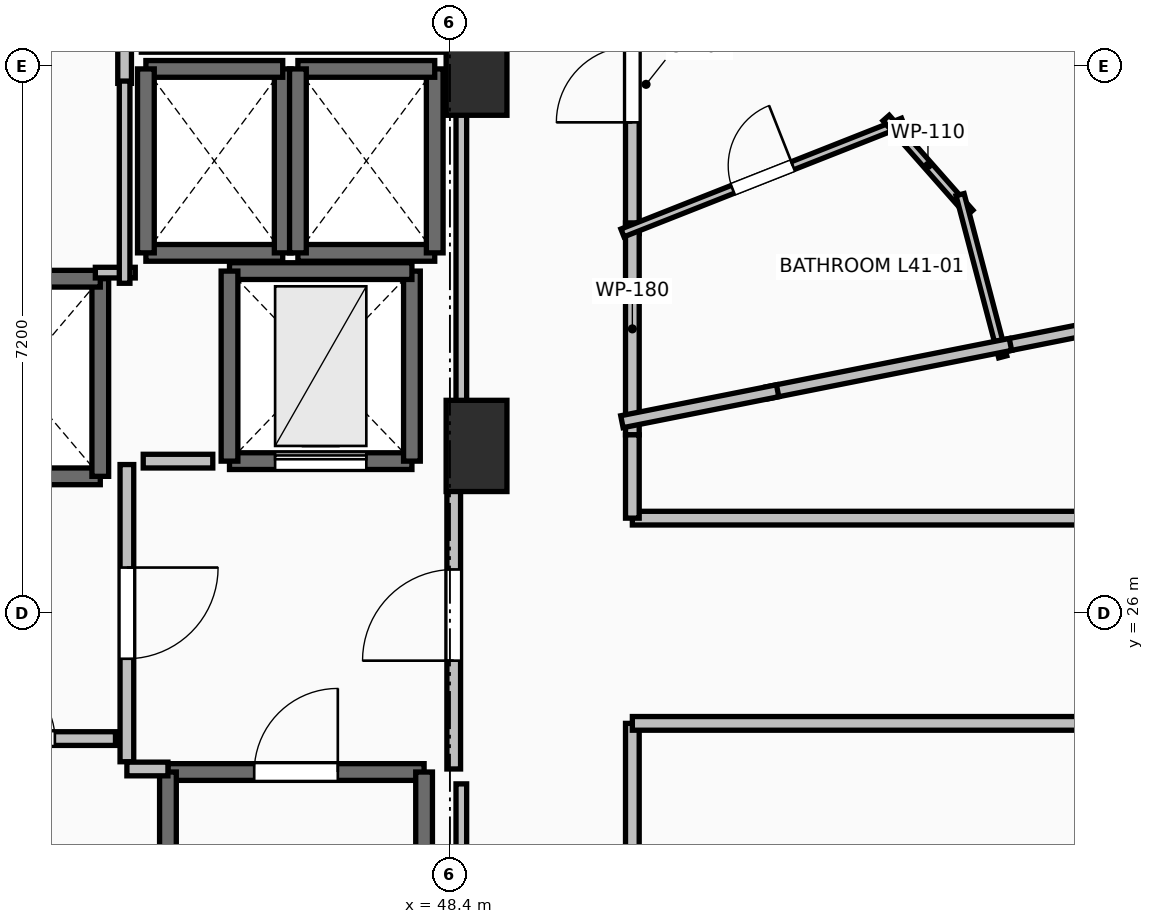
"""IFC4 building model, lengths in metres.
Left out: names, types, materials, properties, quantities, classifications, styles, units other than length and angle.
Written with IfcOpenShell. Run it as: python <this file> out.ifc"""

import sys

from ifc_helpers import new_model, si_unit, direction, frame, frame_2d, origin, origin_2d, place, context, subcontext, project, spatial, rectangle, extrude, element, fill, save


model = new_model("IFC4")
c1 = context("Model", 3, precision=1e-05, world=origin(), true_north=direction((0.0, 1.0)))
c2 = subcontext(c1, "Body", "Model", "MODEL_VIEW")
j1 = project(units=[si_unit("LENGTHUNIT", "METRE"), si_unit("PLANEANGLEUNIT", "RADIAN")], contexts=[c1])
p1 = place(None, origin())
s1 = spatial("IfcSite", under=j1, at=p1, CompositionType="ELEMENT")
p2 = place(p1, origin())
s2 = spatial("IfcBuilding", under=s1, at=p2, CompositionType="ELEMENT")
p3 = place(p2, frame((0.0, 0.0, 153.6)))
s3 = spatial("IfcBuildingStorey", under=s2, at=p3, CompositionType="ELEMENT", Elevation=153.6)
for number, where, z_axis, x_axis in (
    (1, (48.75, 33.15, 0.0), (0.0, 0.0, 1.0), (1.0, 0.0, 0.0)),
    (2, (48.75, 28.2, 0.0), (0.0, 0.0, 1.0), (1.0, 0.0, 0.0)),
):
    element("IfcColumn", number, at=place(p3, frame(where, z_axis=z_axis, x_axis=x_axis)), inside=s3, PredefinedType="PILASTER", context=c2, shape_type="SweptSolid", body=[
        extrude(rectangle(XDim=0.8, YDim=1.2, at=origin_2d()), origin(), (0.0, 0.0, 1.0), 3.5),
    ])
p4 = place(p3, frame((44.69, 23.91, 0.0), z_axis=(0.0, 0.0, 1.0), x_axis=(1.0, 0.0, 0.0)))
e3 = element("IfcWall", 3, at=p4, inside=s3, PredefinedType="SOLIDWALL", context=c2, shape_type="SweptSolid", body=[
    extrude(rectangle(XDim=3.37, YDim=0.22, at=frame_2d((1.685, 0.0))), origin(), (0.0, 0.0, 1.0), 3.24),
])
p5 = place(p4, frame((1.135, 0.0, 0.0)))
e4 = element("IfcOpeningElement", 4, at=p5, cuts=e3, PredefinedType="OPENING", context=c2, shape_type="SweptSolid", body=[
    extrude(rectangle(XDim=1.1, YDim=2.15, at=frame_2d((0.55, 1.075))), frame((0.0, 0.125, 0.0), z_axis=(0.0, -1.0, 0.0), x_axis=(1.0, 0.0, 0.0)), (0.0, 0.0, 1.0), 0.25),
])
for number, where, z_axis, x_axis in (
    (5, (48.06, 23.91, 0.0), (0.0, 0.0, 1.0), (0.0, -1.0, 0.0)),
    (6, (44.69, 16.49, 0.0), (0.0, 0.0, 1.0), (0.0, 1.0, 0.0)),
):
    element("IfcWall", number, at=place(p3, frame(where, z_axis=z_axis, x_axis=x_axis)), inside=s3, PredefinedType="SOLIDWALL", context=c2, shape_type="SweptSolid", body=[
        extrude(rectangle(XDim=7.42, YDim=0.22, at=frame_2d((3.71, 0.0))), origin(), (0.0, 0.0, 1.0), 3.24),
    ])
p6 = place(p3, frame((41.6, 27.8, 0.0), z_axis=(0.0, 0.0, 1.0), x_axis=(1.0, 0.0, 0.0)))
e7 = element("IfcWall", 7, at=p6, inside=s3, PredefinedType="SOLIDWALL", context=c2, shape_type="SweptSolid", body=[
    extrude(rectangle(XDim=2.2, YDim=0.22, at=frame_2d((1.1, 0.0))), origin(), (0.0, 0.0, 1.0), 3.24),
])
p7 = place(p3, frame((43.8, 27.8, 0.0), z_axis=(0.0, 0.0, 1.0), x_axis=(0.0, 1.0, 0.0)))
e8 = element("IfcWall", 8, at=p7, inside=s3, PredefinedType="SOLIDWALL", context=c2, shape_type="SweptSolid", body=[
    extrude(rectangle(XDim=2.6, YDim=0.22, at=frame_2d((1.3, 0.0))), origin(), (0.0, 0.0, 1.0), 3.24),
])
p8 = place(p3, frame((43.8, 30.4, 0.0), z_axis=(0.0, 0.0, 1.0), x_axis=(-1.0, 0.0, 0.0)))
e9 = element("IfcWall", 9, at=p8, inside=s3, PredefinedType="SOLIDWALL", context=c2, shape_type="SweptSolid", body=[
    extrude(rectangle(XDim=2.2, YDim=0.22, at=frame_2d((1.1, 0.0))), origin(), (0.0, 0.0, 1.0), 3.24),
])
p9 = place(p3, frame((44.4, 30.74, 0.0), z_axis=(0.0, 0.0, 1.0), x_axis=(1.0, 0.0, 0.0)))
e10 = element("IfcWall", 10, at=p9, inside=s3, PredefinedType="SOLIDWALL", context=c2, shape_type="SweptSolid", body=[
    extrude(rectangle(XDim=1.8, YDim=0.22, at=frame_2d((0.9, 0.0))), origin(), (0.0, 0.0, 1.0), 3.24),
])
p10 = place(p3, frame((46.2, 30.74, 0.0), z_axis=(0.0, 0.0, 1.0), x_axis=(0.0, 1.0, 0.0)))
e11 = element("IfcWall", 11, at=p10, inside=s3, PredefinedType="SOLIDWALL", context=c2, shape_type="SweptSolid", body=[
    extrude(rectangle(XDim=2.42, YDim=0.22, at=frame_2d((1.21, 0.0))), origin(), (0.0, 0.0, 1.0), 3.24),
])
p11 = place(p3, frame((46.2, 33.16, 0.0), z_axis=(0.0, 0.0, 1.0), x_axis=(-1.0, 0.0, 0.0)))
e12 = element("IfcWall", 12, at=p11, inside=s3, PredefinedType="SOLIDWALL", context=c2, shape_type="SweptSolid", body=[
    extrude(rectangle(XDim=1.8, YDim=0.22, at=frame_2d((0.9, 0.0))), origin(), (0.0, 0.0, 1.0), 3.24),
])
p12 = place(p3, frame((44.4, 33.16, 0.0), z_axis=(0.0, 0.0, 1.0), x_axis=(0.0, -1.0, 0.0)))
e13 = element("IfcWall", 13, at=p12, inside=s3, PredefinedType="SOLIDWALL", context=c2, shape_type="SweptSolid", body=[
    extrude(rectangle(XDim=2.42, YDim=0.22, at=frame_2d((1.21, 0.0))), origin(), (0.0, 0.0, 1.0), 3.24),
])
p13 = place(p3, frame((46.4, 30.74, 0.0), z_axis=(0.0, 0.0, 1.0), x_axis=(1.0, 0.0, 0.0)))
e14 = element("IfcWall", 14, at=p13, inside=s3, PredefinedType="SOLIDWALL", context=c2, shape_type="SweptSolid", body=[
    extrude(rectangle(XDim=1.8, YDim=0.22, at=frame_2d((0.9, 0.0))), origin(), (0.0, 0.0, 1.0), 3.24),
])
p14 = place(p3, frame((48.2, 30.74, 0.0), z_axis=(0.0, 0.0, 1.0), x_axis=(0.0, 1.0, 0.0)))
e15 = element("IfcWall", 15, at=p14, inside=s3, PredefinedType="SOLIDWALL", context=c2, shape_type="SweptSolid", body=[
    extrude(rectangle(XDim=2.42, YDim=0.22, at=frame_2d((1.21, 0.0))), origin(), (0.0, 0.0, 1.0), 3.24),
])
p15 = place(p3, frame((48.2, 33.16, 0.0), z_axis=(0.0, 0.0, 1.0), x_axis=(-1.0, 0.0, 0.0)))
e16 = element("IfcWall", 16, at=p15, inside=s3, PredefinedType="SOLIDWALL", context=c2, shape_type="SweptSolid", body=[
    extrude(rectangle(XDim=1.8, YDim=0.22, at=frame_2d((0.9, 0.0))), origin(), (0.0, 0.0, 1.0), 3.24),
])
p16 = place(p3, frame((46.4, 33.16, 0.0), z_axis=(0.0, 0.0, 1.0), x_axis=(0.0, -1.0, 0.0)))
e17 = element("IfcWall", 17, at=p16, inside=s3, PredefinedType="SOLIDWALL", context=c2, shape_type="SweptSolid", body=[
    extrude(rectangle(XDim=2.42, YDim=0.22, at=frame_2d((1.21, 0.0))), origin(), (0.0, 0.0, 1.0), 3.24),
])
p17 = place(p3, frame((45.5, 28.0, 0.0), z_axis=(0.0, 0.0, 1.0), x_axis=(1.0, 0.0, 0.0)))
e18 = element("IfcWall", 18, at=p17, inside=s3, PredefinedType="SHEAR", context=c2, shape_type="SweptSolid", body=[
    extrude(rectangle(XDim=2.4, YDim=0.22, at=frame_2d((1.2, 0.0))), origin(), (0.0, 0.0, 1.0), 3.24),
])
p18 = place(p17, frame((0.6, 0.0, 0.0)))
e19 = element("IfcOpeningElement", 19, at=p18, cuts=e18, PredefinedType="OPENING", context=c2, shape_type="SweptSolid", body=[
    extrude(rectangle(XDim=1.2, YDim=2.2, at=frame_2d((0.6, 1.1))), frame((0.0, 0.125, 0.0), z_axis=(0.0, -1.0, 0.0), x_axis=(1.0, 0.0, 0.0)), (0.0, 0.0, 1.0), 0.25),
])
p19 = place(p3, frame((47.9, 28.0, 0.0), z_axis=(0.0, 0.0, 1.0), x_axis=(0.0, 1.0, 0.0)))
e20 = element("IfcWall", 20, at=p19, inside=s3, PredefinedType="SHEAR", context=c2, shape_type="SweptSolid", body=[
    extrude(rectangle(XDim=2.5, YDim=0.22, at=frame_2d((1.25, 0.0))), origin(), (0.0, 0.0, 1.0), 3.24),
])
p20 = place(p3, frame((47.9, 30.5, 0.0), z_axis=(0.0, 0.0, 1.0), x_axis=(-1.0, 0.0, 0.0)))
e21 = element("IfcWall", 21, at=p20, inside=s3, PredefinedType="SHEAR", context=c2, shape_type="SweptSolid", body=[
    extrude(rectangle(XDim=2.4, YDim=0.22, at=frame_2d((1.2, 0.0))), origin(), (0.0, 0.0, 1.0), 3.24),
])
p21 = place(p3, frame((45.5, 30.5, 0.0), z_axis=(0.0, 0.0, 1.0), x_axis=(0.0, -1.0, 0.0)))
e22 = element("IfcWall", 22, at=p21, inside=s3, PredefinedType="SHEAR", context=c2, shape_type="SweptSolid", body=[
    extrude(rectangle(XDim=2.5, YDim=0.22, at=frame_2d((1.25, 0.0))), origin(), (0.0, 0.0, 1.0), 3.24),
])
p22 = place(p3, frame((44.15, 27.955, 0.0), z_axis=(0.0, 0.0, 1.0), x_axis=(0.0, -1.0, 0.0)))
e23 = element("IfcWall", 23, at=p22, inside=s3, PredefinedType="PARTITIONING", context=c2, shape_type="SweptSolid", body=[
    extrude(rectangle(XDim=3.91, YDim=0.18, at=frame_2d((1.955, 0.0))), origin(), (0.0, 0.0, 1.0), 3.24),
])
p23 = place(p22, frame((1.355, 0.0, 0.0)))
e24 = element("IfcOpeningElement", 24, at=p23, cuts=e23, PredefinedType="OPENING", context=c2, shape_type="SweptSolid", body=[
    extrude(rectangle(XDim=1.2, YDim=2.15, at=frame_2d((0.6, 1.075))), frame((0.0, 0.105, 0.0), z_axis=(0.0, -1.0, 0.0), x_axis=(1.0, 0.0, 0.0)), (0.0, 0.0, 1.0), 0.21),
])
p24 = place(p3, frame((44.15, 23.95, 0.0), z_axis=(0.0, 0.0, 1.0), x_axis=(1.0, 0.0, 0.0)))
e25 = element("IfcWall", 25, at=p24, inside=s3, PredefinedType="PARTITIONING", context=c2, shape_type="SweptSolid", body=[
    extrude(rectangle(XDim=0.54, YDim=0.18, at=frame_2d((0.27, 0.0))), origin(), (0.0, 0.0, 1.0), 3.24),
])
p25 = place(p3, frame((48.45, 23.95, 0.0), z_axis=(0.0, 0.0, 1.0), x_axis=(0.0, 1.0, 0.0)))
e26 = element("IfcWall", 26, at=p25, inside=s3, PredefinedType="PARTITIONING", context=c2, shape_type="SweptSolid", body=[
    extrude(rectangle(XDim=4.05, YDim=0.18, at=frame_2d((2.025, 0.0))), origin(), (0.0, 0.0, 1.0), 3.24),
])
p26 = place(p25, frame((1.425, 0.0, 0.0)))
e27 = element("IfcOpeningElement", 27, at=p26, cuts=e26, PredefinedType="OPENING", context=c2, shape_type="SweptSolid", body=[
    extrude(rectangle(XDim=1.2, YDim=2.15, at=frame_2d((0.6, 1.075))), frame((0.0, 0.105, 0.0), z_axis=(0.0, -1.0, 0.0), x_axis=(1.0, 0.0, 0.0)), (0.0, 0.0, 1.0), 0.21),
])
p27 = place(p3, frame((41.555, 24.35, 0.0), z_axis=(0.0, 0.0, 1.0), x_axis=(1.0, 0.0, 0.0)))
e28 = element("IfcWall", 28, at=p27, inside=s3, PredefinedType="PARTITIONING", context=c2, shape_type="SweptSolid", body=[
    extrude(rectangle(XDim=2.445, YDim=0.18, at=frame_2d((1.223, 0.0))), origin(), (0.0, 0.0, 1.0), 3.24),
])
p28 = place(p27, frame((0.798, 0.0, 0.0)))
e29 = element("IfcOpeningElement", 29, at=p28, cuts=e28, PredefinedType="OPENING", context=c2, shape_type="SweptSolid", body=[
    extrude(rectangle(XDim=0.85, YDim=2.1, at=frame_2d((0.425, 1.05))), frame((0.0, 0.105, 0.0), z_axis=(0.0, -1.0, 0.0), x_axis=(1.0, 0.0, 0.0)), (0.0, 0.0, 1.0), 0.21),
])
p29 = place(p3, frame((44.12, 32.97, 0.0), z_axis=(0.0, 0.0, 1.0), x_axis=(0.0, 1.0, 0.0)))
e30 = element("IfcWall", 30, at=p29, inside=s3, PredefinedType="PARTITIONING", context=c2, shape_type="SweptSolid", body=[
    extrude(rectangle(XDim=0.93, YDim=0.18, at=frame_2d((0.465, 0.0))), origin(), (0.0, 0.0, 1.0), 3.24),
])
p30 = place(p3, frame((50.8, 30.994, 0.0), z_axis=(0.0, 0.0, 1.0), x_axis=(0.0, 1.0, 0.0)))
e31 = element("IfcWall", 31, at=p30, inside=s3, PredefinedType="PARTITIONING", context=c2, shape_type="SweptSolid", body=[
    extrude(rectangle(XDim=3.926, YDim=0.18, at=frame_2d((1.963, 0.0))), origin(), (0.0, 0.0, 1.0), 2.432),
])
p31 = place(p30, frame((1.463, 0.0, 0.0)))
e32 = element("IfcOpeningElement", 32, at=p31, cuts=e31, PredefinedType="OPENING", context=c2, shape_type="SweptSolid", body=[
    extrude(rectangle(XDim=1.0, YDim=2.15, at=frame_2d((0.5, 1.075))), frame((0.0, 0.105, 0.0), z_axis=(0.0, -1.0, 0.0), x_axis=(1.0, 0.0, 0.0)), (0.0, 0.0, 1.0), 0.21),
])
p32 = place(p3, frame((50.8, 28.346, 0.0), z_axis=(0.0, 0.0, 1.0), x_axis=(0.0, 1.0, 0.0)))
e33 = element("IfcWall", 33, at=p32, inside=s3, PredefinedType="PARTITIONING", context=c2, shape_type="SweptSolid", body=[
    extrude(rectangle(XDim=2.788, YDim=0.18, at=frame_2d((1.394, 0.0))), origin(), (0.0, 0.0, 1.0), 3.24),
])
p33 = place(p3, frame((50.8, 14.05, 0.0), z_axis=(0.0, 0.0, 1.0), x_axis=(0.0, 1.0, 0.0)))
e34 = element("IfcWall", 34, at=p33, inside=s3, PredefinedType="PARTITIONING", context=c2, shape_type="SweptSolid", body=[
    extrude(rectangle(XDim=10.5, YDim=0.18, at=frame_2d((5.25, 0.0))), origin(), (0.0, 0.0, 1.0), 2.432),
])
p34 = place(p33, frame((4.75, 0.0, 0.0)))
e35 = element("IfcOpeningElement", 35, at=p34, cuts=e34, PredefinedType="OPENING", context=c2, shape_type="SweptSolid", body=[
    extrude(rectangle(XDim=1.0, YDim=2.15, at=frame_2d((0.5, 1.075))), frame((0.0, 0.105, 0.0), z_axis=(0.0, -1.0, 0.0), x_axis=(1.0, 0.0, 0.0)), (0.0, 0.0, 1.0), 0.21),
])
for number, where, z_axis, x_axis in (
    (36, (50.8, 24.55, 0.0), (0.0, 0.0, 1.0), (1.0, 0.0, 0.0)),
    (37, (59.9, 27.25, 0.0), (0.0, 0.0, 1.0), (-1.0, 0.0, 0.0)),
):
    element("IfcWall", number, at=place(p3, frame(where, z_axis=z_axis, x_axis=x_axis)), inside=s3, PredefinedType="PARTITIONING", context=c2, shape_type="SweptSolid", body=[
        extrude(rectangle(XDim=9.1, YDim=0.18, at=frame_2d((4.55, 0.0))), origin(), (0.0, 0.0, 1.0), 2.432),
    ])
p35 = place(p3, frame((50.8, 27.25, 0.0), z_axis=(0.0, 0.0, 1.0), x_axis=(0.0, 1.0, 0.0)))
e38 = element("IfcWall", 38, at=p35, inside=s3, PredefinedType="PARTITIONING", context=c2, shape_type="SweptSolid", body=[
    extrude(rectangle(XDim=1.096, YDim=0.18, at=frame_2d((0.548, 0.0))), origin(), (0.0, 0.0, 1.0), 2.432),
])
p36 = place(p3, frame((50.67, 31.003, 0.0), z_axis=(0.0, 0.0, 1.0), x_axis=(0.930092731386, 0.367324803169, 0.0)))
e39 = element("IfcWall", 39, at=p36, inside=s3, PredefinedType="PARTITIONING", context=c2, shape_type="SweptSolid", body=[
    extrude(rectangle(XDim=3.969, YDim=0.11, at=frame_2d((1.984, 0.0))), origin(), (0.0, 0.0, 1.0), 2.886),
])
p37 = place(p36, frame((1.559, 0.0, 0.0)))
e40 = element("IfcOpeningElement", 40, at=p37, cuts=e39, PredefinedType="OPENING", context=c2, shape_type="SweptSolid", body=[
    extrude(rectangle(XDim=0.85, YDim=2.1, at=frame_2d((0.425, 1.05))), frame((0.0, 0.07, 0.0), z_axis=(0.0, -1.0, 0.0), x_axis=(1.0, 0.0, 0.0)), (0.0, 0.0, 1.0), 0.14),
])
p38 = place(p3, frame((54.138, 32.514, 0.0), z_axis=(0.0, 0.0, 1.0), x_axis=(0.661645897528, -0.749816448396, 0.0)))
e41 = element("IfcWall", 41, at=p38, inside=s3, PredefinedType="PARTITIONING", context=c2, shape_type="SweptSolid", body=[
    extrude(rectangle(XDim=1.664, YDim=0.11, at=frame_2d((0.832, 0.0))), origin(), (0.0, 0.0, 1.0), 3.24),
])
p39 = place(p3, frame((55.111, 31.506, 0.0), z_axis=(0.0, 0.0, 1.0), x_axis=(0.254389812051, -0.967101764823, 0.0)))
e42 = element("IfcWall", 42, at=p39, inside=s3, PredefinedType="PARTITIONING", context=c2, shape_type="SweptSolid", body=[
    extrude(rectangle(XDim=2.206, YDim=0.11, at=frame_2d((1.103, 0.0))), origin(), (0.0, 0.0, 1.0), 3.24),
])
p40 = place(p3, frame((55.637, 29.508, 0.0), z_axis=(0.0, 0.0, 1.0), x_axis=(0.98077041661, 0.19516503248, 0.0)))
e43 = element("IfcWall", 43, at=p40, inside=s3, PredefinedType="PARTITIONING", context=c2, shape_type="SweptSolid", body=[
    extrude(rectangle(XDim=6.369, YDim=0.16, at=frame_2d((3.184, 0.0))), origin(), (0.0, 0.0, 1.0), 2.728),
])
p41 = place(p3, frame((52.574, 28.899, 0.0), z_axis=(0.0, 0.0, 1.0), x_axis=(0.980781574696, 0.195108950939, 0.0)))
e44 = element("IfcWall", 44, at=p41, inside=s3, PredefinedType="PARTITIONING", context=c2, shape_type="SweptSolid", body=[
    extrude(rectangle(XDim=3.263, YDim=0.16, at=frame_2d((1.632, 0.0))), origin(), (0.0, 0.0, 1.0), 2.886),
])
p42 = place(p3, frame((50.663, 28.519, 0.0), z_axis=(0.0, 0.0, 1.0), x_axis=(0.980804842296, 0.194991951961, 0.0)))
e45 = element("IfcWall", 45, at=p42, inside=s3, PredefinedType="PARTITIONING", context=c2, shape_type="SweptSolid", body=[
    extrude(rectangle(XDim=2.088, YDim=0.16, at=frame_2d((1.044, 0.0))), origin(), (0.0, 0.0, 1.0), 2.886),
])
p43 = place(p3, frame((45.28, 28.0, 0.0), z_axis=(0.0, 0.0, 1.0), x_axis=(-1.0, 0.0, 0.0)))
e46 = element("IfcWall", 46, at=p43, inside=s3, PredefinedType="PARTITIONING", context=c2, shape_type="SweptSolid", body=[
    extrude(rectangle(XDim=0.915, YDim=0.18, at=frame_2d((0.458, 0.0))), origin(), (0.0, 0.0, 1.0), 3.24),
])
p44 = place(p3, frame((43.735, 30.48, 0.0), z_axis=(0.0, 0.0, 1.0), x_axis=(1.0, 0.0, 0.0)))
e47 = element("IfcWall", 47, at=p44, inside=s3, PredefinedType="PARTITIONING", context=c2, shape_type="SweptSolid", body=[
    extrude(rectangle(XDim=0.525, YDim=0.14, at=frame_2d((0.262, 0.0))), origin(), (0.0, 0.0, 1.0), 3.24),
])
p45 = place(p3, frame((44.12, 30.34, 0.0), z_axis=(0.0, 0.0, 1.0), x_axis=(0.0, 1.0, 0.0)))
e48 = element("IfcWall", 48, at=p45, inside=s3, PredefinedType="PARTITIONING", context=c2, shape_type="SweptSolid", body=[
    extrude(rectangle(XDim=2.66, YDim=0.14, at=frame_2d((1.33, 0.0))), origin(), (0.0, 0.0, 1.0), 3.24),
])
p46 = place(p3, frame((48.55, 16.24, 0.0), z_axis=(0.0, 0.0, 1.0), x_axis=(0.0, 1.0, 0.0)))
e49 = element("IfcWall", 49, at=p46, inside=s3, PredefinedType="PARTITIONING", context=c2, shape_type="SweptSolid", body=[
    extrude(rectangle(XDim=7.514, YDim=0.14, at=frame_2d((3.757, 0.0))), origin(), (0.0, 0.0, 1.0), 2.432),
])
p47 = place(p3, frame((48.55, 28.196, 0.0), z_axis=(0.0, 0.0, 1.0), x_axis=(0.0, 1.0, 0.0)))
e50 = element("IfcWall", 50, at=p47, inside=s3, PredefinedType="PARTITIONING", context=c2, shape_type="SweptSolid", body=[
    extrude(rectangle(XDim=5.254, YDim=0.14, at=frame_2d((2.627, 0.0))), origin(), (0.0, 0.0, 1.0), 2.432),
])
p48 = place(p3, frame((48.55, 33.45, 0.0), z_axis=(0.0, 0.0, 1.0), x_axis=(-1.0, 0.0, 0.0)))
e51 = element("IfcWall", 51, at=p48, inside=s3, PredefinedType="PARTITIONING", context=c2, shape_type="SweptSolid", body=[
    extrude(rectangle(XDim=4.21, YDim=0.14, at=frame_2d((2.105, 0.0))), origin(), (0.0, 0.0, 1.0), 2.432),
])
p49 = place(p5, origin())
e52 = element("IfcDoor", 52, at=p49, inside=s3, OperationType="SINGLE_SWING_RIGHT", PredefinedType="DOOR", context=c2, shape_type="SweptSolid", body=[
    extrude(rectangle(XDim=1.1, YDim=2.15, at=frame_2d((0.55, 1.075))), frame((0.0, 0.025, 0.0), z_axis=(0.0, -1.0, 0.0), x_axis=(1.0, 0.0, 0.0)), (0.0, 0.0, 1.0), 0.05),
])
fill(e4, e52)
p50 = place(p18, origin())
e53 = element("IfcDoor", 53, at=p50, inside=s3, OperationType="SLIDING_TO_LEFT", PredefinedType="DOOR", context=c2, shape_type="SweptSolid", body=[
    extrude(rectangle(XDim=1.2, YDim=2.2, at=frame_2d((0.6, 1.1))), frame((0.0, 0.025, 0.0), z_axis=(0.0, -1.0, 0.0), x_axis=(1.0, 0.0, 0.0)), (0.0, 0.0, 1.0), 0.05),
])
fill(e19, e53)
p51 = place(p23, origin())
e54 = element("IfcDoor", 54, at=p51, inside=s3, OperationType="SINGLE_SWING_LEFT", PredefinedType="DOOR", context=c2, shape_type="SweptSolid", body=[
    extrude(rectangle(XDim=1.2, YDim=2.15, at=frame_2d((0.6, 1.075))), frame((0.0, 0.025, 0.0), z_axis=(0.0, -1.0, 0.0), x_axis=(1.0, 0.0, 0.0)), (0.0, 0.0, 1.0), 0.05),
])
fill(e24, e54)
p52 = place(p26, origin())
e55 = element("IfcDoor", 55, at=p52, inside=s3, OperationType="SINGLE_SWING_LEFT", PredefinedType="DOOR", context=c2, shape_type="SweptSolid", body=[
    extrude(rectangle(XDim=1.2, YDim=2.15, at=frame_2d((0.6, 1.075))), frame((0.0, 0.025, 0.0), z_axis=(0.0, -1.0, 0.0), x_axis=(1.0, 0.0, 0.0)), (0.0, 0.0, 1.0), 0.05),
])
fill(e27, e55)
p53 = place(p28, origin())
e56 = element("IfcDoor", 56, at=p53, inside=s3, OperationType="SINGLE_SWING_LEFT", PredefinedType="DOOR", context=c2, shape_type="SweptSolid", body=[
    extrude(rectangle(XDim=0.85, YDim=2.1, at=frame_2d((0.425, 1.05))), frame((0.0, 0.025, 0.0), z_axis=(0.0, -1.0, 0.0), x_axis=(1.0, 0.0, 0.0)), (0.0, 0.0, 1.0), 0.05),
])
fill(e29, e56)
p54 = place(p31, origin())
e57 = element("IfcDoor", 57, at=p54, inside=s3, OperationType="SINGLE_SWING_LEFT", PredefinedType="DOOR", context=c2, shape_type="SweptSolid", body=[
    extrude(rectangle(XDim=1.0, YDim=2.15, at=frame_2d((0.5, 1.075))), frame((0.0, 0.025, 0.0), z_axis=(0.0, -1.0, 0.0), x_axis=(1.0, 0.0, 0.0)), (0.0, 0.0, 1.0), 0.05),
])
fill(e32, e57)
p55 = place(p37, origin())
e58 = element("IfcDoor", 58, at=p55, inside=s3, OperationType="SINGLE_SWING_RIGHT", PredefinedType="DOOR", context=c2, shape_type="SweptSolid", body=[
    extrude(rectangle(XDim=0.85, YDim=2.1, at=frame_2d((0.425, 1.05))), frame((0.0, 0.025, 0.0), z_axis=(0.0, -1.0, 0.0), x_axis=(1.0, 0.0, 0.0)), (0.0, 0.0, 1.0), 0.05),
])
fill(e40, e58)
save(model, sys.argv[1])
